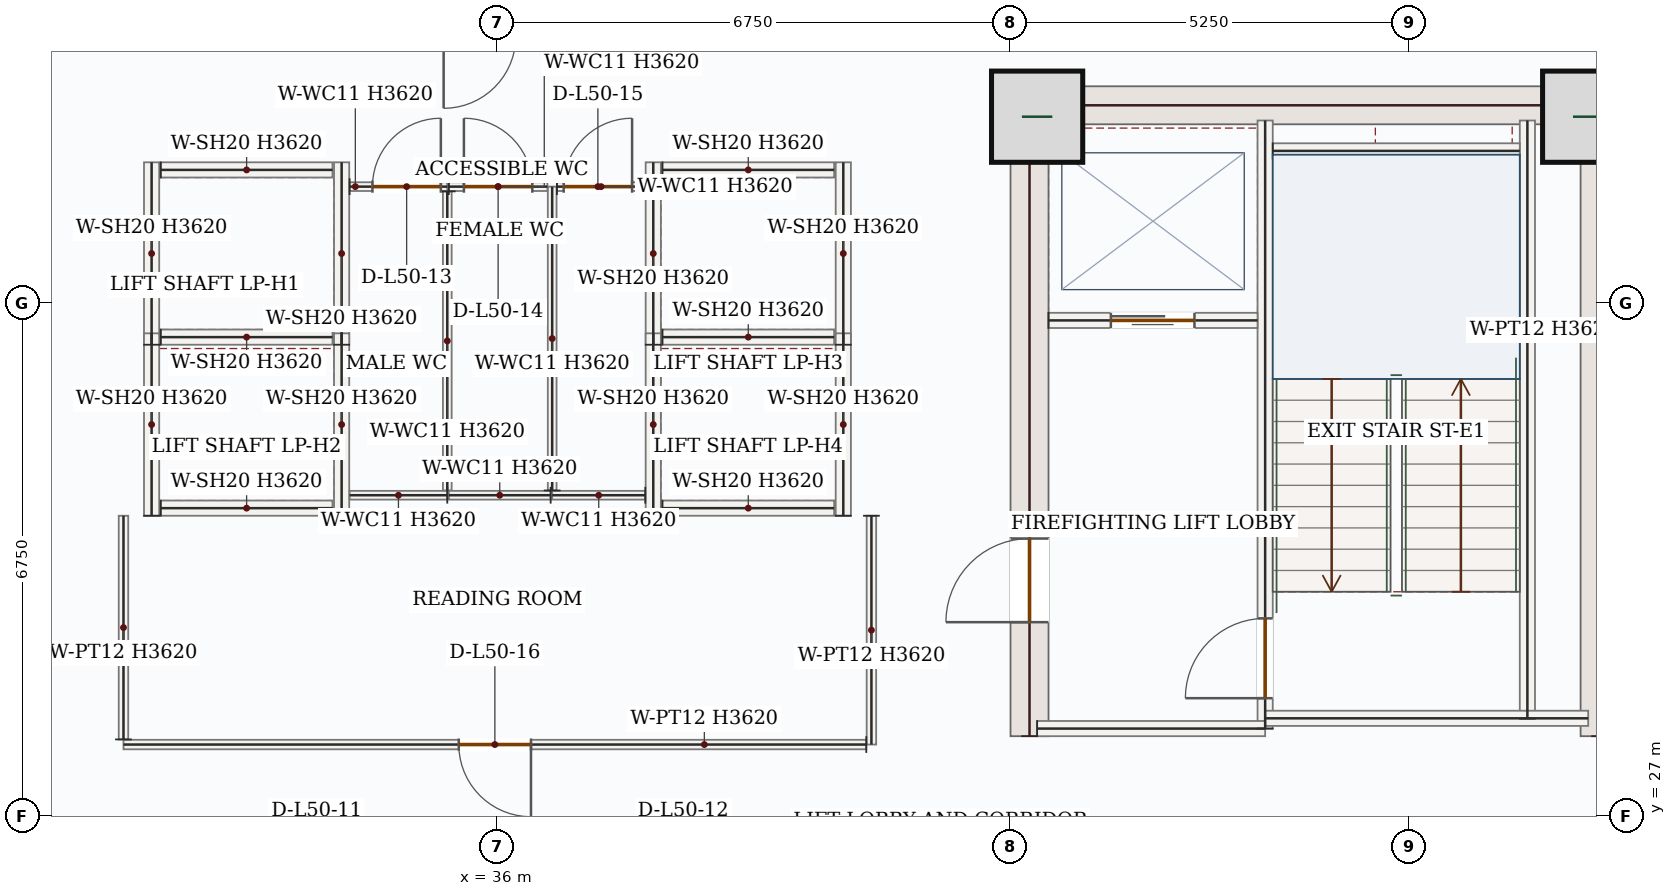
"""IFC4 building model, lengths in metres.
Left out: names, types, materials, properties, quantities, classifications, styles, units other than length and angle.
Written with IfcOpenShell. Run it as: python <this file> out.ifc"""

import sys

from ifc_helpers import new_model, si_unit, direction, frame, frame_2d, origin, origin_2d, place, context, subcontext, project, spatial, rectangle, extrude, source, transform, mapped, element, fill, save


model = new_model("IFC4")
c1 = context("Model", 3, precision=1e-05, world=origin(), true_north=direction((0.0, 1.0)))
c2 = subcontext(c1, "Body", "Model", "MODEL_VIEW")
j1 = project(units=[si_unit("LENGTHUNIT", "METRE"), si_unit("PLANEANGLEUNIT", "RADIAN")], contexts=[c1])
p1 = place(None, origin())
s1 = spatial("IfcSite", under=j1, at=p1, CompositionType="ELEMENT")
p2 = place(p1, origin())
s2 = spatial("IfcBuilding", under=s1, at=p2, CompositionType="ELEMENT")
p3 = place(p2, frame((0.0, 0.0, 213.6)))
s3 = spatial("IfcBuildingStorey", under=s2, at=p3, CompositionType="ELEMENT", Elevation=213.6)
p4 = place(p3, frame((43.0, 28.05, 0.0), z_axis=(0.0, 0.0, 1.0), x_axis=(0.0, 1.0, 0.0)))
e1 = element("IfcWall", 1, at=p4, inside=s3, PredefinedType="SHEAR", context=c2, shape_type="SweptSolid", body=[
    extrude(rectangle(XDim=8.55, YDim=0.5, at=frame_2d((4.275, 0.0))), origin(), (0.0, 0.0, 1.0), 3.62),
])
p5 = place(p4, frame((1.5, 0.0, 0.0)))
e2 = element("IfcOpeningElement", 2, at=p5, cuts=e1, PredefinedType="OPENING", context=c2, shape_type="SweptSolid", body=[
    extrude(rectangle(XDim=1.1, YDim=2.2, at=frame_2d((0.55, 1.1))), frame((0.0, 0.26, 0.0), z_axis=(0.0, -1.0, 0.0), x_axis=(1.0, 0.0, 0.0)), (0.0, 0.0, 1.0), 0.52),
])
m1 = source(origin(), c2, "Body", "SweptSolid", [
    extrude(rectangle(XDim=8.55, YDim=0.5, at=frame_2d((4.275, 0.0))), origin(), (0.0, 0.0, 1.0), 3.62),
])
p6 = place(p3, frame((50.5, 28.05, 0.0), z_axis=(0.0, 0.0, 1.0), x_axis=(0.0, 1.0, 0.0)))
e3 = element("IfcWall", 3, at=p6, inside=s3, PredefinedType="SHEAR", context=c2, shape_type="MappedRepresentation", body=[
    mapped(m1, transform((0.0, 0.0, 0.0), x_axis=(1.0, 0.0, 0.0), y_axis=(0.0, 1.0, 0.0), z_axis=(0.0, 0.0, 1.0), scale=1.0)),
])
m2 = source(origin(), c2, "Body", "SweptSolid", [
    extrude(rectangle(XDim=7.0, YDim=0.5, at=frame_2d((3.5, 0.0))), origin(), (0.0, 0.0, 1.0), 3.62),
])
p7 = place(p3, frame((43.25, 36.35, 0.0), z_axis=(0.0, 0.0, 1.0), x_axis=(1.0, 0.0, 0.0)))
e4 = element("IfcWall", 4, at=p7, inside=s3, PredefinedType="SHEAR", context=c2, shape_type="MappedRepresentation", body=[
    mapped(m2, transform((0.0, 0.0, 0.0), x_axis=(1.0, 0.0, 0.0), y_axis=(0.0, 1.0, 0.0), z_axis=(0.0, 0.0, 1.0), scale=1.0)),
])
m3 = source(origin(), c2, "Body", "SweptSolid", [
    extrude(rectangle(XDim=1.2, YDim=1.2, at=origin_2d()), origin(), (0.0, 0.0, 1.0), 3.9),
])
for number, where, z_axis, x_axis in (
    (5, (43.1, 36.2, 0.0), (0.0, 0.0, 1.0), (1.0, 0.0, 0.0)),
    (6, (50.35, 36.2, 0.0), (0.0, 0.0, 1.0), (1.0, 0.0, 0.0)),
):
    element("IfcColumn", number, at=place(p3, frame(where, z_axis=z_axis, x_axis=x_axis)), inside=s3, PredefinedType="COLUMN", context=c2, shape_type="MappedRepresentation", body=[
        mapped(m3, transform((0.0, 0.0, 0.0), x_axis=(1.0, 0.0, 0.0), y_axis=(0.0, 1.0, 0.0), z_axis=(0.0, 0.0, 1.0), scale=1.0)),
    ])
m4 = source(origin(), c2, "Body", "SweptSolid", [
    extrude(rectangle(XDim=7.87, YDim=0.2, at=frame_2d((3.935, 0.0))), origin(), (0.0, 0.0, 1.0), 3.62),
])
p8 = place(p3, frame((49.55, 28.28, 0.0), z_axis=(0.0, 0.0, 1.0), x_axis=(0.0, 1.0, 0.0)))
e7 = element("IfcWall", 7, at=p8, inside=s3, PredefinedType="SOLIDWALL", context=c2, shape_type="MappedRepresentation", body=[
    mapped(m4, transform((0.0, 0.0, 0.0), x_axis=(1.0, 0.0, 0.0), y_axis=(0.0, 1.0, 0.0), z_axis=(0.0, 0.0, 1.0), scale=1.0)),
])
p9 = place(p3, frame((46.1, 28.15, 0.0), z_axis=(0.0, 0.0, 1.0), x_axis=(0.0, 1.0, 0.0)))
e8 = element("IfcWall", 8, at=p9, inside=s3, PredefinedType="SOLIDWALL", context=c2, shape_type="SweptSolid", body=[
    extrude(rectangle(XDim=8.0, YDim=0.2, at=frame_2d((4.0, 0.0))), origin(), (0.0, 0.0, 1.0), 3.62),
])
p10 = place(p9, frame((0.4, 0.0, 0.0)))
e9 = element("IfcOpeningElement", 9, at=p10, cuts=e8, PredefinedType="OPENING", context=c2, shape_type="SweptSolid", body=[
    extrude(rectangle(XDim=1.05, YDim=2.15, at=frame_2d((0.525, 1.075))), frame((0.0, 0.11, 0.0), z_axis=(0.0, -1.0, 0.0), x_axis=(1.0, 0.0, 0.0)), (0.0, 0.0, 1.0), 0.22),
])
m5 = source(origin(), c2, "Body", "SweptSolid", [
    extrude(rectangle(XDim=3.0, YDim=0.2, at=frame_2d((1.5, 0.0))), origin(), (0.0, 0.0, 1.0), 3.62),
])
p11 = place(p3, frame((43.1, 28.15, 0.0), z_axis=(0.0, 0.0, 1.0), x_axis=(1.0, 0.0, 0.0)))
e10 = element("IfcWall", 10, at=p11, inside=s3, PredefinedType="SOLIDWALL", context=c2, shape_type="MappedRepresentation", body=[
    mapped(m5, transform((0.0, 0.0, 0.0), x_axis=(1.0, 0.0, 0.0), y_axis=(0.0, 1.0, 0.0), z_axis=(0.0, 0.0, 1.0), scale=1.0)),
])
m6 = source(origin(), c2, "Body", "SweptSolid", [
    extrude(rectangle(XDim=4.25, YDim=0.2, at=frame_2d((2.125, 0.0))), origin(), (0.0, 0.0, 1.0), 3.62),
])
p12 = place(p3, frame((46.1, 28.285, 0.0), z_axis=(0.0, 0.0, 1.0), x_axis=(1.0, 0.0, 0.0)))
e11 = element("IfcWall", 11, at=p12, inside=s3, PredefinedType="SOLIDWALL", context=c2, shape_type="MappedRepresentation", body=[
    mapped(m6, transform((0.0, 0.0, 0.0), x_axis=(1.0, 0.0, 0.0), y_axis=(0.0, 1.0, 0.0), z_axis=(0.0, 0.0, 1.0), scale=1.0)),
])
m7 = source(origin(), c2, "Body", "SweptSolid", [
    extrude(rectangle(XDim=3.25, YDim=0.2, at=frame_2d((1.625, 0.0))), origin(), (0.0, 0.0, 1.0), 3.62),
])
p13 = place(p3, frame((46.2, 35.75, 0.0), z_axis=(0.0, 0.0, 1.0), x_axis=(1.0, 0.0, 0.0)))
e12 = element("IfcWall", 12, at=p13, inside=s3, PredefinedType="SOLIDWALL", context=c2, shape_type="MappedRepresentation", body=[
    mapped(m7, transform((0.0, 0.0, 0.0), x_axis=(1.0, 0.0, 0.0), y_axis=(0.0, 1.0, 0.0), z_axis=(0.0, 0.0, 1.0), scale=1.0)),
])
p14 = place(p3, frame((43.25, 33.52, 0.0), z_axis=(0.0, 0.0, 1.0), x_axis=(1.0, 0.0, 0.0)))
e13 = element("IfcWall", 13, at=p14, inside=s3, PredefinedType="SOLIDWALL", context=c2, shape_type="SweptSolid", body=[
    extrude(rectangle(XDim=2.75, YDim=0.2, at=frame_2d((1.375, 0.0))), origin(), (0.0, 0.0, 1.0), 3.62),
])
p15 = place(p14, frame((0.82, 0.0, 0.0)))
e14 = element("IfcOpeningElement", 14, at=p15, cuts=e13, PredefinedType="OPENING", context=c2, shape_type="SweptSolid", body=[
    extrude(rectangle(XDim=1.1, YDim=2.15, at=frame_2d((0.55, 1.075))), frame((0.0, 0.11, 0.0), z_axis=(0.0, -1.0, 0.0), x_axis=(1.0, 0.0, 0.0)), (0.0, 0.0, 1.0), 0.22),
])
m8 = source(origin(), c2, "Body", "SweptSolid", [
    extrude(rectangle(XDim=2.4, YDim=0.2, at=frame_2d((1.2, 0.0))), origin(), (0.0, 0.0, 1.0), 3.62),
])
for number, where, z_axis, x_axis in (
    (15, (31.45, 33.2, 0.0), (0.0, 0.0, 1.0), (0.0, 1.0, 0.0)),
    (16, (33.95, 33.2, 0.0), (0.0, 0.0, 1.0), (0.0, 1.0, 0.0)),
):
    element("IfcWall", number, at=place(p3, frame(where, z_axis=z_axis, x_axis=x_axis)), inside=s3, PredefinedType="SOLIDWALL", context=c2, shape_type="MappedRepresentation", body=[
        mapped(m8, transform((0.0, 0.0, 0.0), x_axis=(1.0, 0.0, 0.0), y_axis=(0.0, 1.0, 0.0), z_axis=(0.0, 0.0, 1.0), scale=1.0)),
    ])
m9 = source(origin(), c2, "Body", "SweptSolid", [
    extrude(rectangle(XDim=2.26, YDim=0.2, at=frame_2d((1.13, 0.0))), origin(), (0.0, 0.0, 1.0), 3.62),
])
for number, where, z_axis, x_axis in (
    (17, (31.57, 33.3, 0.0), (0.0, 0.0, 1.0), (1.0, 0.0, 0.0)),
    (18, (31.57, 35.5, 0.0), (0.0, 0.0, 1.0), (1.0, 0.0, 0.0)),
):
    element("IfcWall", number, at=place(p3, frame(where, z_axis=z_axis, x_axis=x_axis)), inside=s3, PredefinedType="SOLIDWALL", context=c2, shape_type="MappedRepresentation", body=[
        mapped(m9, transform((0.0, 0.0, 0.0), x_axis=(1.0, 0.0, 0.0), y_axis=(0.0, 1.0, 0.0), z_axis=(0.0, 0.0, 1.0), scale=1.0)),
    ])
for number, where, z_axis, x_axis in (
    (19, (31.45, 30.95, 0.0), (0.0, 0.0, 1.0), (0.0, 1.0, 0.0)),
    (20, (33.95, 30.95, 0.0), (0.0, 0.0, 1.0), (0.0, 1.0, 0.0)),
):
    element("IfcWall", number, at=place(p3, frame(where, z_axis=z_axis, x_axis=x_axis)), inside=s3, PredefinedType="SOLIDWALL", context=c2, shape_type="MappedRepresentation", body=[
        mapped(m8, transform((0.0, 0.0, 0.0), x_axis=(1.0, 0.0, 0.0), y_axis=(0.0, 1.0, 0.0), z_axis=(0.0, 0.0, 1.0), scale=1.0)),
    ])
p16 = place(p3, frame((31.57, 31.05, 0.0), z_axis=(0.0, 0.0, 1.0), x_axis=(1.0, 0.0, 0.0)))
e21 = element("IfcWall", 21, at=p16, inside=s3, PredefinedType="SOLIDWALL", context=c2, shape_type="MappedRepresentation", body=[
    mapped(m9, transform((0.0, 0.0, 0.0), x_axis=(1.0, 0.0, 0.0), y_axis=(0.0, 1.0, 0.0), z_axis=(0.0, 0.0, 1.0), scale=1.0)),
])
for number, where, z_axis, x_axis in (
    (22, (38.05, 33.2, 0.0), (0.0, 0.0, 1.0), (0.0, 1.0, 0.0)),
    (23, (40.55, 33.2, 0.0), (0.0, 0.0, 1.0), (0.0, 1.0, 0.0)),
):
    element("IfcWall", number, at=place(p3, frame(where, z_axis=z_axis, x_axis=x_axis)), inside=s3, PredefinedType="SOLIDWALL", context=c2, shape_type="MappedRepresentation", body=[
        mapped(m8, transform((0.0, 0.0, 0.0), x_axis=(1.0, 0.0, 0.0), y_axis=(0.0, 1.0, 0.0), z_axis=(0.0, 0.0, 1.0), scale=1.0)),
    ])
for number, where, z_axis, x_axis in (
    (24, (38.17, 33.3, 0.0), (0.0, 0.0, 1.0), (1.0, 0.0, 0.0)),
    (25, (38.17, 35.5, 0.0), (0.0, 0.0, 1.0), (1.0, 0.0, 0.0)),
):
    element("IfcWall", number, at=place(p3, frame(where, z_axis=z_axis, x_axis=x_axis)), inside=s3, PredefinedType="SOLIDWALL", context=c2, shape_type="MappedRepresentation", body=[
        mapped(m9, transform((0.0, 0.0, 0.0), x_axis=(1.0, 0.0, 0.0), y_axis=(0.0, 1.0, 0.0), z_axis=(0.0, 0.0, 1.0), scale=1.0)),
    ])
for number, where, z_axis, x_axis in (
    (26, (38.05, 30.95, 0.0), (0.0, 0.0, 1.0), (0.0, 1.0, 0.0)),
    (27, (40.55, 30.95, 0.0), (0.0, 0.0, 1.0), (0.0, 1.0, 0.0)),
):
    element("IfcWall", number, at=place(p3, frame(where, z_axis=z_axis, x_axis=x_axis)), inside=s3, PredefinedType="SOLIDWALL", context=c2, shape_type="MappedRepresentation", body=[
        mapped(m8, transform((0.0, 0.0, 0.0), x_axis=(1.0, 0.0, 0.0), y_axis=(0.0, 1.0, 0.0), z_axis=(0.0, 0.0, 1.0), scale=1.0)),
    ])
p17 = place(p3, frame((38.17, 31.05, 0.0), z_axis=(0.0, 0.0, 1.0), x_axis=(1.0, 0.0, 0.0)))
e28 = element("IfcWall", 28, at=p17, inside=s3, PredefinedType="SOLIDWALL", context=c2, shape_type="MappedRepresentation", body=[
    mapped(m9, transform((0.0, 0.0, 0.0), x_axis=(1.0, 0.0, 0.0), y_axis=(0.0, 1.0, 0.0), z_axis=(0.0, 0.0, 1.0), scale=1.0)),
])
m10 = source(origin(), c2, "Body", "SweptSolid", [
    extrude(rectangle(XDim=1.225, YDim=0.115, at=frame_2d((0.613, 0.0))), origin(), (0.0, 0.0, 1.0), 3.62),
])
p18 = place(p3, frame((37.945, 31.22, 0.0), z_axis=(0.0, 0.0, 1.0), x_axis=(-1.0, 0.0, 0.0)))
e29 = element("IfcWall", 29, at=p18, inside=s3, PredefinedType="PARTITIONING", context=c2, shape_type="MappedRepresentation", body=[
    mapped(m10, transform((0.0, 0.0, 0.0), x_axis=(1.0, 0.0, 0.0), y_axis=(0.0, 1.0, 0.0), z_axis=(0.0, 0.0, 1.0), scale=1.0)),
])
m11 = source(origin(), c2, "Body", "SweptSolid", [
    extrude(rectangle(XDim=3.998, YDim=0.115, at=frame_2d((1.999, 0.0))), origin(), (0.0, 0.0, 1.0), 3.62),
])
p19 = place(p3, frame((36.72, 31.282, 0.0), z_axis=(0.0, 0.0, 1.0), x_axis=(0.0, 1.0, 0.0)))
e30 = element("IfcWall", 30, at=p19, inside=s3, PredefinedType="PARTITIONING", context=c2, shape_type="MappedRepresentation", body=[
    mapped(m11, transform((0.0, 0.0, 0.0), x_axis=(1.0, 0.0, 0.0), y_axis=(0.0, 1.0, 0.0), z_axis=(0.0, 0.0, 1.0), scale=1.0)),
])
p20 = place(p3, frame((36.782, 35.28, 0.0), z_axis=(0.0, 0.0, 1.0), x_axis=(1.0, 0.0, 0.0)))
e31 = element("IfcWall", 31, at=p20, inside=s3, PredefinedType="PARTITIONING", context=c2, shape_type="SweptSolid", body=[
    extrude(rectangle(XDim=1.163, YDim=0.115, at=frame_2d((0.581, 0.0))), origin(), (0.0, 0.0, 1.0), 3.62),
])
p21 = place(p20, frame((0.089, 0.0, 0.0)))
e32 = element("IfcOpeningElement", 32, at=p21, cuts=e31, PredefinedType="OPENING", context=c2, shape_type="SweptSolid", body=[
    extrude(rectangle(XDim=0.9, YDim=2.1, at=frame_2d((0.45, 1.05))), frame((0.0, 0.067, 0.0), z_axis=(0.0, -1.0, 0.0), x_axis=(1.0, 0.0, 0.0)), (0.0, 0.0, 1.0), 0.135),
])
m12 = source(origin(), c2, "Body", "SweptSolid", [
    extrude(rectangle(XDim=1.285, YDim=0.115, at=frame_2d((0.643, 0.0))), origin(), (0.0, 0.0, 1.0), 3.62),
])
p22 = place(p3, frame((35.34, 31.22, 0.0), z_axis=(0.0, 0.0, 1.0), x_axis=(-1.0, 0.0, 0.0)))
e33 = element("IfcWall", 33, at=p22, inside=s3, PredefinedType="PARTITIONING", context=c2, shape_type="MappedRepresentation", body=[
    mapped(m12, transform((0.0, 0.0, 0.0), x_axis=(1.0, 0.0, 0.0), y_axis=(0.0, 1.0, 0.0), z_axis=(0.0, 0.0, 1.0), scale=1.0)),
])
p23 = place(p3, frame((34.055, 35.28, 0.0), z_axis=(0.0, 0.0, 1.0), x_axis=(1.0, 0.0, 0.0)))
e34 = element("IfcWall", 34, at=p23, inside=s3, PredefinedType="PARTITIONING", context=c2, shape_type="SweptSolid", body=[
    extrude(rectangle(XDim=1.285, YDim=0.115, at=frame_2d((0.643, 0.0))), origin(), (0.0, 0.0, 1.0), 3.62),
])
p24 = place(p23, frame((0.3, 0.0, 0.0)))
e35 = element("IfcOpeningElement", 35, at=p24, cuts=e34, PredefinedType="OPENING", context=c2, shape_type="SweptSolid", body=[
    extrude(rectangle(XDim=0.9, YDim=2.1, at=frame_2d((0.45, 1.05))), frame((0.0, 0.067, 0.0), z_axis=(0.0, -1.0, 0.0), x_axis=(1.0, 0.0, 0.0)), (0.0, 0.0, 1.0), 0.135),
])
m13 = source(origin(), c2, "Body", "SweptSolid", [
    extrude(rectangle(XDim=3.935, YDim=0.115, at=frame_2d((1.968, 0.0))), origin(), (0.0, 0.0, 1.0), 3.62),
])
p25 = place(p3, frame((35.34, 35.218, 0.0), z_axis=(0.0, 0.0, 1.0), x_axis=(0.0, -1.0, 0.0)))
e36 = element("IfcWall", 36, at=p25, inside=s3, PredefinedType="PARTITIONING", context=c2, shape_type="MappedRepresentation", body=[
    mapped(m13, transform((0.0, 0.0, 0.0), x_axis=(1.0, 0.0, 0.0), y_axis=(0.0, 1.0, 0.0), z_axis=(0.0, 0.0, 1.0), scale=1.0)),
])
m14 = source(origin(), c2, "Body", "SweptSolid", [
    extrude(rectangle(XDim=1.34, YDim=0.115, at=frame_2d((0.67, 0.0))), origin(), (0.0, 0.0, 1.0), 3.62),
])
p26 = place(p3, frame((36.7, 31.22, 0.0), z_axis=(0.0, 0.0, 1.0), x_axis=(-1.0, 0.0, 0.0)))
e37 = element("IfcWall", 37, at=p26, inside=s3, PredefinedType="PARTITIONING", context=c2, shape_type="MappedRepresentation", body=[
    mapped(m14, transform((0.0, 0.0, 0.0), x_axis=(1.0, 0.0, 0.0), y_axis=(0.0, 1.0, 0.0), z_axis=(0.0, 0.0, 1.0), scale=1.0)),
])
p27 = place(p3, frame((35.36, 35.28, 0.0), z_axis=(0.0, 0.0, 1.0), x_axis=(1.0, 0.0, 0.0)))
e38 = element("IfcWall", 38, at=p27, inside=s3, PredefinedType="PARTITIONING", context=c2, shape_type="SweptSolid", body=[
    extrude(rectangle(XDim=1.297, YDim=0.115, at=frame_2d((0.649, 0.0))), origin(), (0.0, 0.0, 1.0), 3.62),
])
p28 = place(p27, frame((0.199, 0.0, 0.0)))
e39 = element("IfcOpeningElement", 39, at=p28, cuts=e38, PredefinedType="OPENING", context=c2, shape_type="SweptSolid", body=[
    extrude(rectangle(XDim=0.9, YDim=2.1, at=frame_2d((0.45, 1.05))), frame((0.0, 0.067, 0.0), z_axis=(0.0, -1.0, 0.0), x_axis=(1.0, 0.0, 0.0)), (0.0, 0.0, 1.0), 0.135),
])
m15 = source(origin(), c2, "Body", "SweptSolid", [
    extrude(rectangle(XDim=3.01, YDim=0.125, at=frame_2d((1.505, 0.0))), origin(), (0.0, 0.0, 1.0), 3.62),
])
p29 = place(p3, frame((40.92, 30.95, 0.0), z_axis=(0.0, 0.0, 1.0), x_axis=(0.0, -1.0, 0.0)))
e40 = element("IfcWall", 40, at=p29, inside=s3, PredefinedType="PARTITIONING", context=c2, shape_type="MappedRepresentation", body=[
    mapped(m15, transform((0.0, 0.0, 0.0), x_axis=(1.0, 0.0, 0.0), y_axis=(0.0, 1.0, 0.0), z_axis=(0.0, 0.0, 1.0), scale=1.0)),
])
p30 = place(p3, frame((40.853, 27.94, 0.0), z_axis=(0.0, 0.0, 1.0), x_axis=(-1.0, 0.0, 0.0)))
e41 = element("IfcWall", 41, at=p30, inside=s3, PredefinedType="PARTITIONING", context=c2, shape_type="SweptSolid", body=[
    extrude(rectangle(XDim=9.772, YDim=0.125, at=frame_2d((4.886, 0.0))), origin(), (0.0, 0.0, 1.0), 3.62),
])
p31 = place(p30, frame((4.411, 0.0, 0.0)))
e42 = element("IfcOpeningElement", 42, at=p31, cuts=e41, PredefinedType="OPENING", context=c2, shape_type="SweptSolid", body=[
    extrude(rectangle(XDim=0.95, YDim=2.15, at=frame_2d((0.475, 1.075))), frame((0.0, 0.073, 0.0), z_axis=(0.0, -1.0, 0.0), x_axis=(1.0, 0.0, 0.0)), (0.0, 0.0, 1.0), 0.145),
])
m16 = source(origin(), c2, "Body", "SweptSolid", [
    extrude(rectangle(XDim=2.942, YDim=0.125, at=frame_2d((1.471, 0.0))), origin(), (0.0, 0.0, 1.0), 3.62),
])
p32 = place(p3, frame((31.08, 28.008, 0.0), z_axis=(0.0, 0.0, 1.0), x_axis=(0.0, 1.0, 0.0)))
e43 = element("IfcWall", 43, at=p32, inside=s3, PredefinedType="PARTITIONING", context=c2, shape_type="MappedRepresentation", body=[
    mapped(m16, transform((0.0, 0.0, 0.0), x_axis=(1.0, 0.0, 0.0), y_axis=(0.0, 1.0, 0.0), z_axis=(0.0, 0.0, 1.0), scale=1.0)),
])
m17 = source(origin(), c2, "Body", "SweptSolid", [
    extrude(rectangle(XDim=1.05, YDim=2.15, at=frame_2d((0.525, 1.075))), frame((0.0, 0.025, 0.0), z_axis=(0.0, -1.0, 0.0), x_axis=(1.0, 0.0, 0.0)), (0.0, 0.0, 1.0), 0.05),
])
p33 = place(p10, origin())
e44 = element("IfcDoor", 44, at=p33, inside=s3, OperationType="SINGLE_SWING_LEFT", PredefinedType="DOOR", context=c2, shape_type="MappedRepresentation", body=[
    mapped(m17, transform((0.0, 0.0, 0.0), x_axis=(1.0, 0.0, 0.0), y_axis=(0.0, 1.0, 0.0), z_axis=(0.0, 0.0, 1.0), scale=1.0)),
])
fill(e9, e44)
m18 = source(origin(), c2, "Body", "SweptSolid", [
    extrude(rectangle(XDim=1.1, YDim=2.15, at=frame_2d((0.55, 1.075))), frame((0.0, 0.025, 0.0), z_axis=(0.0, -1.0, 0.0), x_axis=(1.0, 0.0, 0.0)), (0.0, 0.0, 1.0), 0.05),
])
p34 = place(p15, origin())
e45 = element("IfcDoor", 45, at=p34, inside=s3, OperationType="DOUBLE_DOOR_SLIDING", PredefinedType="DOOR", context=c2, shape_type="MappedRepresentation", body=[
    mapped(m18, transform((0.0, 0.0, 0.0), x_axis=(1.0, 0.0, 0.0), y_axis=(0.0, 1.0, 0.0), z_axis=(0.0, 0.0, 1.0), scale=1.0)),
])
fill(e14, e45)
m19 = source(origin(), c2, "Body", "SweptSolid", [
    extrude(rectangle(XDim=1.1, YDim=2.2, at=frame_2d((0.55, 1.1))), frame((0.0, 0.025, 0.0), z_axis=(0.0, -1.0, 0.0), x_axis=(1.0, 0.0, 0.0)), (0.0, 0.0, 1.0), 0.05),
])
p35 = place(p5, origin())
e46 = element("IfcDoor", 46, at=p35, inside=s3, OperationType="SINGLE_SWING_LEFT", PredefinedType="DOOR", context=c2, shape_type="MappedRepresentation", body=[
    mapped(m19, transform((0.0, 0.0, 0.0), x_axis=(1.0, 0.0, 0.0), y_axis=(0.0, 1.0, 0.0), z_axis=(0.0, 0.0, 1.0), scale=1.0)),
])
fill(e2, e46)
m20 = source(origin(), c2, "Body", "SweptSolid", [
    extrude(rectangle(XDim=0.9, YDim=2.1, at=frame_2d((0.45, 1.05))), frame((0.0, 0.025, 0.0), z_axis=(0.0, -1.0, 0.0), x_axis=(1.0, 0.0, 0.0)), (0.0, 0.0, 1.0), 0.05),
])
p36 = place(p24, origin())
e47 = element("IfcDoor", 47, at=p36, inside=s3, OperationType="SINGLE_SWING_RIGHT", PredefinedType="DOOR", context=c2, shape_type="MappedRepresentation", body=[
    mapped(m20, transform((0.0, 0.0, 0.0), x_axis=(1.0, 0.0, 0.0), y_axis=(0.0, 1.0, 0.0), z_axis=(0.0, 0.0, 1.0), scale=1.0)),
])
fill(e35, e47)
p37 = place(p28, origin())
e48 = element("IfcDoor", 48, at=p37, inside=s3, OperationType="SINGLE_SWING_LEFT", PredefinedType="DOOR", context=c2, shape_type="MappedRepresentation", body=[
    mapped(m20, transform((0.0, 0.0, 0.0), x_axis=(1.0, 0.0, 0.0), y_axis=(0.0, 1.0, 0.0), z_axis=(0.0, 0.0, 1.0), scale=1.0)),
])
fill(e39, e48)
p38 = place(p21, origin())
e49 = element("IfcDoor", 49, at=p38, inside=s3, OperationType="SINGLE_SWING_RIGHT", PredefinedType="DOOR", context=c2, shape_type="MappedRepresentation", body=[
    mapped(m20, transform((0.0, 0.0, 0.0), x_axis=(1.0, 0.0, 0.0), y_axis=(0.0, 1.0, 0.0), z_axis=(0.0, 0.0, 1.0), scale=1.0)),
])
fill(e32, e49)
m21 = source(origin(), c2, "Body", "SweptSolid", [
    extrude(rectangle(XDim=0.95, YDim=2.15, at=frame_2d((0.475, 1.075))), frame((0.0, 0.025, 0.0), z_axis=(0.0, -1.0, 0.0), x_axis=(1.0, 0.0, 0.0)), (0.0, 0.0, 1.0), 0.05),
])
p39 = place(p31, origin())
e50 = element("IfcDoor", 50, at=p39, inside=s3, OperationType="SINGLE_SWING_LEFT", PredefinedType="DOOR", context=c2, shape_type="MappedRepresentation", body=[
    mapped(m21, transform((0.0, 0.0, 0.0), x_axis=(1.0, 0.0, 0.0), y_axis=(0.0, 1.0, 0.0), z_axis=(0.0, 0.0, 1.0), scale=1.0)),
])
fill(e42, e50)
save(model, sys.argv[1])
